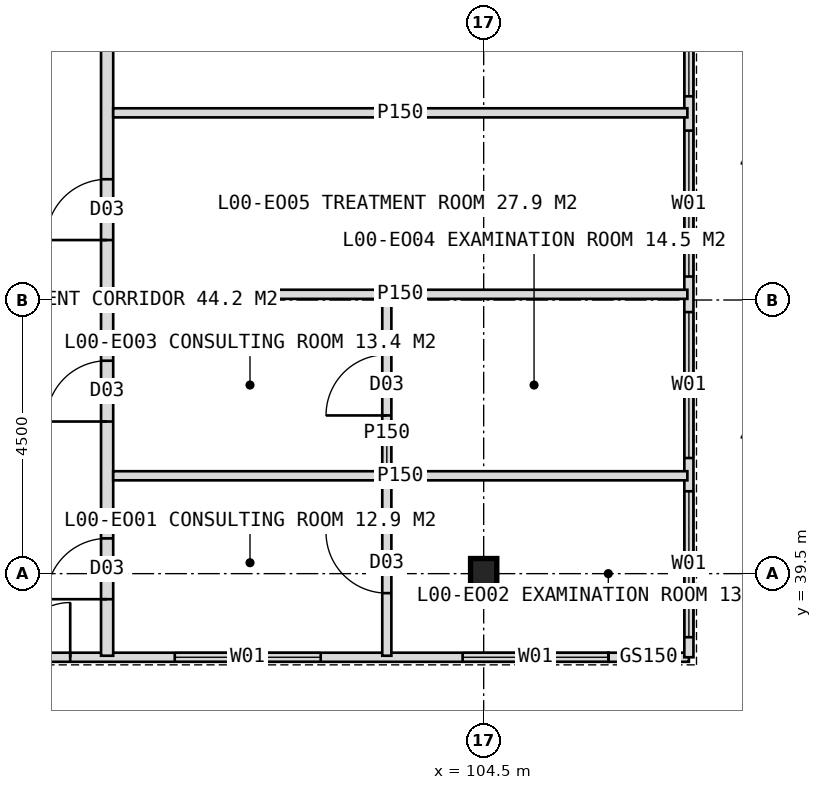
"""IFC4 building model, lengths in metres.
Left out: names, types, materials, properties, quantities, classifications, styles, units other than length and angle.
Written with IfcOpenShell. Run it as: python <this file> out.ifc"""

import sys

from ifc_helpers import new_model, si_unit, direction, frame, frame_2d, origin, origin_2d, place, context, subcontext, project, spatial, rectangle, i_section, extrude, element, fill, save


model = new_model("IFC4")
c1 = context("Model", 3, precision=1e-05, world=origin(), true_north=direction((0.0, 1.0)))
c2 = subcontext(c1, "Body", "Model", "MODEL_VIEW")
j1 = project(units=[si_unit("LENGTHUNIT", "METRE"), si_unit("PLANEANGLEUNIT", "RADIAN")], contexts=[c1])
p1 = place(None, origin())
s1 = spatial("IfcSite", under=j1, at=p1, CompositionType="ELEMENT")
p2 = place(p1, origin())
s2 = spatial("IfcBuilding", under=s1, at=p2, CompositionType="ELEMENT")
p3 = place(p2, origin())
s3 = spatial("IfcBuildingStorey", under=s2, at=p3, CompositionType="ELEMENT", Elevation=0.0)
p4 = place(p3, frame((104.5, 39.5, 0.0), z_axis=(0.0, 0.0, 1.0), x_axis=(1.0, 0.0, 0.0)))
e1 = element("IfcColumn", 1, at=p4, inside=s3, PredefinedType="COLUMN", context=c2, shape_type="SweptSolid", body=[
    extrude(i_section(OverallWidth=0.432, OverallDepth=0.498, WebThickness=0.056, FlangeThickness=0.089, FilletRadius=0.015, at=origin_2d()), origin(), (0.0, 0.0, 1.0), 6.0),
])
p5 = place(p3, frame((86.5, 38.125, 0.0), z_axis=(0.0, 0.0, 1.0), x_axis=(1.0, 0.0, 0.0)))
e2 = element("IfcWall", 2, at=p5, inside=s3, PredefinedType="STANDARD", context=c2, shape_type="SweptSolid", body=[
    extrude(rectangle(XDim=20.053, YDim=0.15, at=frame_2d((10.027, 0.0))), origin(), (0.0, 0.0, 1.0), 5.1),
])
p6 = place(p5, frame((9.4, 0.0, 0.0)))
e3 = element("IfcOpeningElement", 3, at=p6, cuts=e2, PredefinedType="OPENING", context=c2, shape_type="SweptSolid", body=[
    extrude(rectangle(XDim=1.8, YDim=2.4, at=frame_2d((0.9, 1.2))), frame((0.0, 0.085, 0.0), z_axis=(0.0, -1.0, 0.0), x_axis=(1.0, 0.0, 0.0)), (0.0, 0.0, 1.0), 0.17),
])
p7 = place(p5, frame((0.322, 0.0, 0.6)))
e4 = element("IfcOpeningElement", 4, at=p7, cuts=e2, PredefinedType="OPENING", context=c2, shape_type="SweptSolid", body=[
    extrude(rectangle(XDim=2.4, YDim=3.0, at=frame_2d((1.2, 1.5))), frame((0.0, 0.085, 0.0), z_axis=(0.0, -1.0, 0.0), x_axis=(1.0, 0.0, 0.0)), (0.0, 0.0, 1.0), 0.17),
])
p8 = place(p5, frame((12.919, 0.0, 0.6)))
e5 = element("IfcOpeningElement", 5, at=p8, cuts=e2, PredefinedType="OPENING", context=c2, shape_type="SweptSolid", body=[
    extrude(rectangle(XDim=2.4, YDim=3.0, at=frame_2d((1.2, 1.5))), frame((0.0, 0.085, 0.0), z_axis=(0.0, -1.0, 0.0), x_axis=(1.0, 0.0, 0.0)), (0.0, 0.0, 1.0), 0.17),
])
p9 = place(p5, frame((17.654, 0.0, 0.6)))
e6 = element("IfcOpeningElement", 6, at=p9, cuts=e2, PredefinedType="OPENING", context=c2, shape_type="SweptSolid", body=[
    extrude(rectangle(XDim=2.4, YDim=3.0, at=frame_2d((1.2, 1.5))), frame((0.0, 0.085, 0.0), z_axis=(0.0, -1.0, 0.0), x_axis=(1.0, 0.0, 0.0)), (0.0, 0.0, 1.0), 0.17),
])
p10 = place(p3, frame((106.553, 38.125, 0.0), z_axis=(0.0, 0.0, 1.0), x_axis=(1.0, 0.0, 0.0)))
e7 = element("IfcWall", 7, at=p10, inside=s3, PredefinedType="STANDARD", context=c2, shape_type="SweptSolid", body=[
    extrude(rectangle(XDim=1.322, YDim=0.15, at=frame_2d((0.661, 0.0))), origin(), (0.0, 0.0, 1.0), 6.0),
])
p11 = place(p3, frame((107.875, 38.125, 0.0), z_axis=(0.0, 0.0, 1.0), x_axis=(0.0, 1.0, 0.0)))
e8 = element("IfcWall", 8, at=p11, inside=s3, PredefinedType="STANDARD", context=c2, shape_type="SweptSolid", body=[
    extrude(rectangle(XDim=47.75, YDim=0.15, at=frame_2d((23.875, 0.0))), origin(), (0.0, 0.0, 1.0), 6.0),
])
p12 = place(p11, frame((22.7, 0.0, 0.0)))
e9 = element("IfcOpeningElement", 9, at=p12, cuts=e8, PredefinedType="OPENING", context=c2, shape_type="SweptSolid", body=[
    extrude(rectangle(XDim=2.4, YDim=2.6, at=frame_2d((1.2, 1.3))), frame((0.0, 0.085, 0.0), z_axis=(0.0, -1.0, 0.0), x_axis=(1.0, 0.0, 0.0)), (0.0, 0.0, 1.0), 0.17),
])
p13 = place(p11, frame((0.33, 0.0, 0.6)))
e10 = element("IfcOpeningElement", 10, at=p13, cuts=e8, PredefinedType="OPENING", context=c2, shape_type="SweptSolid", body=[
    extrude(rectangle(XDim=2.4, YDim=3.0, at=frame_2d((1.2, 1.5))), frame((0.0, 0.085, 0.0), z_axis=(0.0, -1.0, 0.0), x_axis=(1.0, 0.0, 0.0)), (0.0, 0.0, 1.0), 0.17),
])
p14 = place(p11, frame((3.277, 0.0, 0.6)))
e11 = element("IfcOpeningElement", 11, at=p14, cuts=e8, PredefinedType="OPENING", context=c2, shape_type="SweptSolid", body=[
    extrude(rectangle(XDim=2.4, YDim=3.0, at=frame_2d((1.2, 1.5))), frame((0.0, 0.085, 0.0), z_axis=(0.0, -1.0, 0.0), x_axis=(1.0, 0.0, 0.0)), (0.0, 0.0, 1.0), 0.17),
])
p15 = place(p11, frame((6.261, 0.0, 0.6)))
e12 = element("IfcOpeningElement", 12, at=p15, cuts=e8, PredefinedType="OPENING", context=c2, shape_type="SweptSolid", body=[
    extrude(rectangle(XDim=2.4, YDim=3.0, at=frame_2d((1.2, 1.5))), frame((0.0, 0.085, 0.0), z_axis=(0.0, -1.0, 0.0), x_axis=(1.0, 0.0, 0.0)), (0.0, 0.0, 1.0), 0.17),
])
p16 = place(p11, frame((9.225, 0.0, 0.6)))
e13 = element("IfcOpeningElement", 13, at=p16, cuts=e8, PredefinedType="OPENING", context=c2, shape_type="SweptSolid", body=[
    extrude(rectangle(XDim=2.4, YDim=3.0, at=frame_2d((1.2, 1.5))), frame((0.0, 0.085, 0.0), z_axis=(0.0, -1.0, 0.0), x_axis=(1.0, 0.0, 0.0)), (0.0, 0.0, 1.0), 0.17),
])
p17 = place(p11, frame((12.225, 0.0, 0.6)))
e14 = element("IfcOpeningElement", 14, at=p17, cuts=e8, PredefinedType="OPENING", context=c2, shape_type="SweptSolid", body=[
    extrude(rectangle(XDim=2.4, YDim=3.0, at=frame_2d((1.2, 1.5))), frame((0.0, 0.085, 0.0), z_axis=(0.0, -1.0, 0.0), x_axis=(1.0, 0.0, 0.0)), (0.0, 0.0, 1.0), 0.17),
])
p18 = place(p11, frame((15.227, 0.0, 0.6)))
e15 = element("IfcOpeningElement", 15, at=p18, cuts=e8, PredefinedType="OPENING", context=c2, shape_type="SweptSolid", body=[
    extrude(rectangle(XDim=2.4, YDim=3.0, at=frame_2d((1.2, 1.5))), frame((0.0, 0.085, 0.0), z_axis=(0.0, -1.0, 0.0), x_axis=(1.0, 0.0, 0.0)), (0.0, 0.0, 1.0), 0.17),
])
p19 = place(p11, frame((18.198, 0.0, 0.6)))
e16 = element("IfcOpeningElement", 16, at=p19, cuts=e8, PredefinedType="OPENING", context=c2, shape_type="SweptSolid", body=[
    extrude(rectangle(XDim=2.4, YDim=3.0, at=frame_2d((1.2, 1.5))), frame((0.0, 0.085, 0.0), z_axis=(0.0, -1.0, 0.0), x_axis=(1.0, 0.0, 0.0)), (0.0, 0.0, 1.0), 0.17),
])
p20 = place(p11, frame((27.152, 0.0, 0.6)))
e17 = element("IfcOpeningElement", 17, at=p20, cuts=e8, PredefinedType="OPENING", context=c2, shape_type="SweptSolid", body=[
    extrude(rectangle(XDim=2.4, YDim=3.0, at=frame_2d((1.2, 1.5))), frame((0.0, 0.085, 0.0), z_axis=(0.0, -1.0, 0.0), x_axis=(1.0, 0.0, 0.0)), (0.0, 0.0, 1.0), 0.17),
])
p21 = place(p11, frame((30.136, 0.0, 0.6)))
e18 = element("IfcOpeningElement", 18, at=p21, cuts=e8, PredefinedType="OPENING", context=c2, shape_type="SweptSolid", body=[
    extrude(rectangle(XDim=2.4, YDim=3.0, at=frame_2d((1.2, 1.5))), frame((0.0, 0.085, 0.0), z_axis=(0.0, -1.0, 0.0), x_axis=(1.0, 0.0, 0.0)), (0.0, 0.0, 1.0), 0.17),
])
p22 = place(p11, frame((33.12, 0.0, 0.6)))
e19 = element("IfcOpeningElement", 19, at=p22, cuts=e8, PredefinedType="OPENING", context=c2, shape_type="SweptSolid", body=[
    extrude(rectangle(XDim=2.4, YDim=3.0, at=frame_2d((1.2, 1.5))), frame((0.0, 0.085, 0.0), z_axis=(0.0, -1.0, 0.0), x_axis=(1.0, 0.0, 0.0)), (0.0, 0.0, 1.0), 0.17),
])
p23 = place(p11, frame((36.044, 0.0, 0.6)))
e20 = element("IfcOpeningElement", 20, at=p23, cuts=e8, PredefinedType="OPENING", context=c2, shape_type="SweptSolid", body=[
    extrude(rectangle(XDim=2.4, YDim=3.0, at=frame_2d((1.2, 1.5))), frame((0.0, 0.085, 0.0), z_axis=(0.0, -1.0, 0.0), x_axis=(1.0, 0.0, 0.0)), (0.0, 0.0, 1.0), 0.17),
])
p24 = place(p11, frame((39.044, 0.0, 0.6)))
e21 = element("IfcOpeningElement", 21, at=p24, cuts=e8, PredefinedType="OPENING", context=c2, shape_type="SweptSolid", body=[
    extrude(rectangle(XDim=2.4, YDim=3.0, at=frame_2d((1.2, 1.5))), frame((0.0, 0.085, 0.0), z_axis=(0.0, -1.0, 0.0), x_axis=(1.0, 0.0, 0.0)), (0.0, 0.0, 1.0), 0.17),
])
p25 = place(p11, frame((42.044, 0.0, 0.6)))
e22 = element("IfcOpeningElement", 22, at=p25, cuts=e8, PredefinedType="OPENING", context=c2, shape_type="SweptSolid", body=[
    extrude(rectangle(XDim=2.4, YDim=3.0, at=frame_2d((1.2, 1.5))), frame((0.0, 0.085, 0.0), z_axis=(0.0, -1.0, 0.0), x_axis=(1.0, 0.0, 0.0)), (0.0, 0.0, 1.0), 0.17),
])
p26 = place(p11, frame((45.044, 0.0, 0.6)))
e23 = element("IfcOpeningElement", 23, at=p26, cuts=e8, PredefinedType="OPENING", context=c2, shape_type="SweptSolid", body=[
    extrude(rectangle(XDim=2.4, YDim=3.0, at=frame_2d((1.2, 1.5))), frame((0.0, 0.085, 0.0), z_axis=(0.0, -1.0, 0.0), x_axis=(1.0, 0.0, 0.0)), (0.0, 0.0, 1.0), 0.17),
])
p27 = place(p3, frame((98.307, 38.15, 0.0), z_axis=(0.0, 0.0, 1.0), x_axis=(0.0, 1.0, 0.0)))
e24 = element("IfcWall", 24, at=p27, inside=s3, PredefinedType="PARTITIONING", context=c2, shape_type="SweptSolid", body=[
    extrude(rectangle(XDim=47.7, YDim=0.2, at=frame_2d((23.85, 0.0))), origin(), (0.0, 0.0, 1.0), 5.7),
])
p28 = place(p27, frame((45.7, 0.0, 0.0)))
e25 = element("IfcOpeningElement", 25, at=p28, cuts=e24, PredefinedType="OPENING", context=c2, shape_type="SweptSolid", body=[
    extrude(rectangle(XDim=1.2, YDim=2.1, at=frame_2d((0.6, 1.05))), frame((0.0, 0.11, 0.0), z_axis=(0.0, -1.0, 0.0), x_axis=(1.0, 0.0, 0.0)), (0.0, 0.0, 1.0), 0.22),
])
p29 = place(p27, frame((36.244, 0.0, 0.0)))
e26 = element("IfcOpeningElement", 26, at=p29, cuts=e24, PredefinedType="OPENING", context=c2, shape_type="SweptSolid", body=[
    extrude(rectangle(XDim=1.0, YDim=2.1, at=frame_2d((0.5, 1.05))), frame((0.0, 0.11, 0.0), z_axis=(0.0, -1.0, 0.0), x_axis=(1.0, 0.0, 0.0)), (0.0, 0.0, 1.0), 0.22),
])
p30 = place(p27, frame((0.93, 0.0, 0.0)))
e27 = element("IfcOpeningElement", 27, at=p30, cuts=e24, PredefinedType="OPENING", context=c2, shape_type="SweptSolid", body=[
    extrude(rectangle(XDim=1.0, YDim=2.1, at=frame_2d((0.5, 1.05))), frame((0.0, 0.11, 0.0), z_axis=(0.0, -1.0, 0.0), x_axis=(1.0, 0.0, 0.0)), (0.0, 0.0, 1.0), 0.22),
])
p31 = place(p27, frame((3.852, 0.0, 0.0)))
e28 = element("IfcOpeningElement", 28, at=p31, cuts=e24, PredefinedType="OPENING", context=c2, shape_type="SweptSolid", body=[
    extrude(rectangle(XDim=1.0, YDim=2.1, at=frame_2d((0.5, 1.05))), frame((0.0, 0.11, 0.0), z_axis=(0.0, -1.0, 0.0), x_axis=(1.0, 0.0, 0.0)), (0.0, 0.0, 1.0), 0.22),
])
p32 = place(p27, frame((6.836, 0.0, 0.0)))
e29 = element("IfcOpeningElement", 29, at=p32, cuts=e24, PredefinedType="OPENING", context=c2, shape_type="SweptSolid", body=[
    extrude(rectangle(XDim=1.0, YDim=2.1, at=frame_2d((0.5, 1.05))), frame((0.0, 0.11, 0.0), z_axis=(0.0, -1.0, 0.0), x_axis=(1.0, 0.0, 0.0)), (0.0, 0.0, 1.0), 0.22),
])
p33 = place(p27, frame((11.012, 0.0, 0.0)))
e30 = element("IfcOpeningElement", 30, at=p33, cuts=e24, PredefinedType="OPENING", context=c2, shape_type="SweptSolid", body=[
    extrude(rectangle(XDim=1.6, YDim=2.2, at=frame_2d((0.8, 1.1))), frame((0.0, 0.11, 0.0), z_axis=(0.0, -1.0, 0.0), x_axis=(1.0, 0.0, 0.0)), (0.0, 0.0, 1.0), 0.22),
])
p34 = place(p27, frame((15.789, 0.0, 0.0)))
e31 = element("IfcOpeningElement", 31, at=p34, cuts=e24, PredefinedType="OPENING", context=c2, shape_type="SweptSolid", body=[
    extrude(rectangle(XDim=1.0, YDim=2.1, at=frame_2d((0.5, 1.05))), frame((0.0, 0.11, 0.0), z_axis=(0.0, -1.0, 0.0), x_axis=(1.0, 0.0, 0.0)), (0.0, 0.0, 1.0), 0.22),
])
p35 = place(p27, frame((18.773, 0.0, 0.0)))
e32 = element("IfcOpeningElement", 32, at=p35, cuts=e24, PredefinedType="OPENING", context=c2, shape_type="SweptSolid", body=[
    extrude(rectangle(XDim=1.0, YDim=2.1, at=frame_2d((0.5, 1.05))), frame((0.0, 0.11, 0.0), z_axis=(0.0, -1.0, 0.0), x_axis=(1.0, 0.0, 0.0)), (0.0, 0.0, 1.0), 0.22),
])
p36 = place(p27, frame((22.95, 0.0, 0.0)))
e33 = element("IfcOpeningElement", 33, at=p36, cuts=e24, PredefinedType="OPENING", context=c2, shape_type="SweptSolid", body=[
    extrude(rectangle(XDim=1.6, YDim=2.2, at=frame_2d((0.8, 1.1))), frame((0.0, 0.11, 0.0), z_axis=(0.0, -1.0, 0.0), x_axis=(1.0, 0.0, 0.0)), (0.0, 0.0, 1.0), 0.22),
])
p37 = place(p27, frame((27.727, 0.0, 0.0)))
e34 = element("IfcOpeningElement", 34, at=p37, cuts=e24, PredefinedType="OPENING", context=c2, shape_type="SweptSolid", body=[
    extrude(rectangle(XDim=1.0, YDim=2.1, at=frame_2d((0.5, 1.05))), frame((0.0, 0.11, 0.0), z_axis=(0.0, -1.0, 0.0), x_axis=(1.0, 0.0, 0.0)), (0.0, 0.0, 1.0), 0.22),
])
p38 = place(p27, frame((30.711, 0.0, 0.0)))
e35 = element("IfcOpeningElement", 35, at=p38, cuts=e24, PredefinedType="OPENING", context=c2, shape_type="SweptSolid", body=[
    extrude(rectangle(XDim=1.0, YDim=2.1, at=frame_2d((0.5, 1.05))), frame((0.0, 0.11, 0.0), z_axis=(0.0, -1.0, 0.0), x_axis=(1.0, 0.0, 0.0)), (0.0, 0.0, 1.0), 0.22),
])
p39 = place(p27, frame((33.695, 0.0, 0.0)))
e36 = element("IfcOpeningElement", 36, at=p39, cuts=e24, PredefinedType="OPENING", context=c2, shape_type="SweptSolid", body=[
    extrude(rectangle(XDim=1.0, YDim=2.1, at=frame_2d((0.5, 1.05))), frame((0.0, 0.11, 0.0), z_axis=(0.0, -1.0, 0.0), x_axis=(1.0, 0.0, 0.0)), (0.0, 0.0, 1.0), 0.22),
])
for number, where, z_axis, x_axis in (
    (37, (107.85, 41.109, 0.0), (0.0, 0.0, 1.0), (-1.0, 0.0, 0.0)),
    (38, (107.85, 44.094, 0.0), (0.0, 0.0, 1.0), (-1.0, 0.0, 0.0)),
    (39, (107.85, 47.078, 0.0), (0.0, 0.0, 1.0), (-1.0, 0.0, 0.0)),
):
    element("IfcWall", number, at=place(p3, frame(where, z_axis=z_axis, x_axis=x_axis)), inside=s3, PredefinedType="PARTITIONING", context=c2, shape_type="SweptSolid", body=[
        extrude(rectangle(XDim=9.443, YDim=0.15, at=frame_2d((4.722, 0.0))), origin(), (0.0, 0.0, 1.0), 5.7),
    ])
p40 = place(p3, frame((102.907, 38.15, 0.0), z_axis=(0.0, 0.0, 1.0), x_axis=(0.0, 1.0, 0.0)))
e40 = element("IfcWall", 40, at=p40, inside=s3, PredefinedType="PARTITIONING", context=c2, shape_type="SweptSolid", body=[
    extrude(rectangle(XDim=5.944, YDim=0.15, at=frame_2d((2.972, 0.0))), origin(), (0.0, 0.0, 1.0), 5.7),
])
p41 = place(p40, frame((1.03, 0.0, 0.0)))
e41 = element("IfcOpeningElement", 41, at=p41, cuts=e40, PredefinedType="OPENING", context=c2, shape_type="SweptSolid", body=[
    extrude(rectangle(XDim=1.0, YDim=2.1, at=frame_2d((0.5, 1.05))), frame((0.0, 0.085, 0.0), z_axis=(0.0, -1.0, 0.0), x_axis=(1.0, 0.0, 0.0)), (0.0, 0.0, 1.0), 0.17),
])
p42 = place(p40, frame((3.952, 0.0, 0.0)))
e42 = element("IfcOpeningElement", 42, at=p42, cuts=e40, PredefinedType="OPENING", context=c2, shape_type="SweptSolid", body=[
    extrude(rectangle(XDim=1.0, YDim=2.1, at=frame_2d((0.5, 1.05))), frame((0.0, 0.085, 0.0), z_axis=(0.0, -1.0, 0.0), x_axis=(1.0, 0.0, 0.0)), (0.0, 0.0, 1.0), 0.17),
])
p43 = place(p6, frame((1.8, 0.0, 0.0), z_axis=(0.0, 0.0, 1.0), x_axis=(-1.0, 0.0, 0.0)))
e43 = element("IfcDoor", 43, at=p43, inside=s3, OperationType="DOUBLE_DOOR_SINGLE_SWING", PredefinedType="DOOR", context=c2, shape_type="SweptSolid", body=[
    extrude(rectangle(XDim=1.8, YDim=2.4, at=frame_2d((0.9, 1.2))), frame((0.0, 0.025, 0.0), z_axis=(0.0, -1.0, 0.0), x_axis=(1.0, 0.0, 0.0)), (0.0, 0.0, 1.0), 0.05),
])
fill(e3, e43)
p44 = place(p8, origin())
e44 = element("IfcWindow", 44, at=p44, inside=s3, PartitioningType="SINGLE_PANEL", PredefinedType="WINDOW", context=c2, shape_type="SweptSolid", body=[
    extrude(rectangle(XDim=2.4, YDim=3.0, at=frame_2d((1.2, 1.5))), frame((0.0, 0.03, 0.0), z_axis=(0.0, -1.0, 0.0), x_axis=(1.0, 0.0, 0.0)), (0.0, 0.0, 1.0), 0.06),
])
fill(e5, e44)
p45 = place(p9, origin())
e45 = element("IfcWindow", 45, at=p45, inside=s3, PartitioningType="SINGLE_PANEL", PredefinedType="WINDOW", context=c2, shape_type="SweptSolid", body=[
    extrude(rectangle(XDim=2.4, YDim=3.0, at=frame_2d((1.2, 1.5))), frame((0.0, 0.03, 0.0), z_axis=(0.0, -1.0, 0.0), x_axis=(1.0, 0.0, 0.0)), (0.0, 0.0, 1.0), 0.06),
])
fill(e6, e45)
p46 = place(p13, origin())
e46 = element("IfcWindow", 46, at=p46, inside=s3, PartitioningType="SINGLE_PANEL", PredefinedType="WINDOW", context=c2, shape_type="SweptSolid", body=[
    extrude(rectangle(XDim=2.4, YDim=3.0, at=frame_2d((1.2, 1.5))), frame((0.0, 0.03, 0.0), z_axis=(0.0, -1.0, 0.0), x_axis=(1.0, 0.0, 0.0)), (0.0, 0.0, 1.0), 0.06),
])
fill(e10, e46)
p47 = place(p14, origin())
e47 = element("IfcWindow", 47, at=p47, inside=s3, PartitioningType="SINGLE_PANEL", PredefinedType="WINDOW", context=c2, shape_type="SweptSolid", body=[
    extrude(rectangle(XDim=2.4, YDim=3.0, at=frame_2d((1.2, 1.5))), frame((0.0, 0.03, 0.0), z_axis=(0.0, -1.0, 0.0), x_axis=(1.0, 0.0, 0.0)), (0.0, 0.0, 1.0), 0.06),
])
fill(e11, e47)
p48 = place(p15, origin())
e48 = element("IfcWindow", 48, at=p48, inside=s3, PartitioningType="SINGLE_PANEL", PredefinedType="WINDOW", context=c2, shape_type="SweptSolid", body=[
    extrude(rectangle(XDim=2.4, YDim=3.0, at=frame_2d((1.2, 1.5))), frame((0.0, 0.03, 0.0), z_axis=(0.0, -1.0, 0.0), x_axis=(1.0, 0.0, 0.0)), (0.0, 0.0, 1.0), 0.06),
])
fill(e12, e48)
p49 = place(p16, origin())
e49 = element("IfcWindow", 49, at=p49, inside=s3, PartitioningType="SINGLE_PANEL", PredefinedType="WINDOW", context=c2, shape_type="SweptSolid", body=[
    extrude(rectangle(XDim=2.4, YDim=3.0, at=frame_2d((1.2, 1.5))), frame((0.0, 0.03, 0.0), z_axis=(0.0, -1.0, 0.0), x_axis=(1.0, 0.0, 0.0)), (0.0, 0.0, 1.0), 0.06),
])
fill(e13, e49)
p50 = place(p30, origin())
e50 = element("IfcDoor", 50, at=p50, inside=s3, OperationType="SINGLE_SWING_LEFT", PredefinedType="DOOR", context=c2, shape_type="SweptSolid", body=[
    extrude(rectangle(XDim=1.0, YDim=2.1, at=frame_2d((0.5, 1.05))), frame((0.0, 0.025, 0.0), z_axis=(0.0, -1.0, 0.0), x_axis=(1.0, 0.0, 0.0)), (0.0, 0.0, 1.0), 0.05),
])
fill(e27, e50)
p51 = place(p41, origin())
e51 = element("IfcDoor", 51, at=p51, inside=s3, OperationType="SINGLE_SWING_RIGHT", PredefinedType="DOOR", context=c2, shape_type="SweptSolid", body=[
    extrude(rectangle(XDim=1.0, YDim=2.1, at=frame_2d((0.5, 1.05))), frame((0.0, 0.025, 0.0), z_axis=(0.0, -1.0, 0.0), x_axis=(1.0, 0.0, 0.0)), (0.0, 0.0, 1.0), 0.05),
])
fill(e41, e51)
p52 = place(p31, origin())
e52 = element("IfcDoor", 52, at=p52, inside=s3, OperationType="SINGLE_SWING_LEFT", PredefinedType="DOOR", context=c2, shape_type="SweptSolid", body=[
    extrude(rectangle(XDim=1.0, YDim=2.1, at=frame_2d((0.5, 1.05))), frame((0.0, 0.025, 0.0), z_axis=(0.0, -1.0, 0.0), x_axis=(1.0, 0.0, 0.0)), (0.0, 0.0, 1.0), 0.05),
])
fill(e28, e52)
p53 = place(p42, origin())
e53 = element("IfcDoor", 53, at=p53, inside=s3, OperationType="SINGLE_SWING_LEFT", PredefinedType="DOOR", context=c2, shape_type="SweptSolid", body=[
    extrude(rectangle(XDim=1.0, YDim=2.1, at=frame_2d((0.5, 1.05))), frame((0.0, 0.025, 0.0), z_axis=(0.0, -1.0, 0.0), x_axis=(1.0, 0.0, 0.0)), (0.0, 0.0, 1.0), 0.05),
])
fill(e42, e53)
p54 = place(p32, origin())
e54 = element("IfcDoor", 54, at=p54, inside=s3, OperationType="SINGLE_SWING_LEFT", PredefinedType="DOOR", context=c2, shape_type="SweptSolid", body=[
    extrude(rectangle(XDim=1.0, YDim=2.1, at=frame_2d((0.5, 1.05))), frame((0.0, 0.025, 0.0), z_axis=(0.0, -1.0, 0.0), x_axis=(1.0, 0.0, 0.0)), (0.0, 0.0, 1.0), 0.05),
])
fill(e29, e54)
save(model, sys.argv[1])
